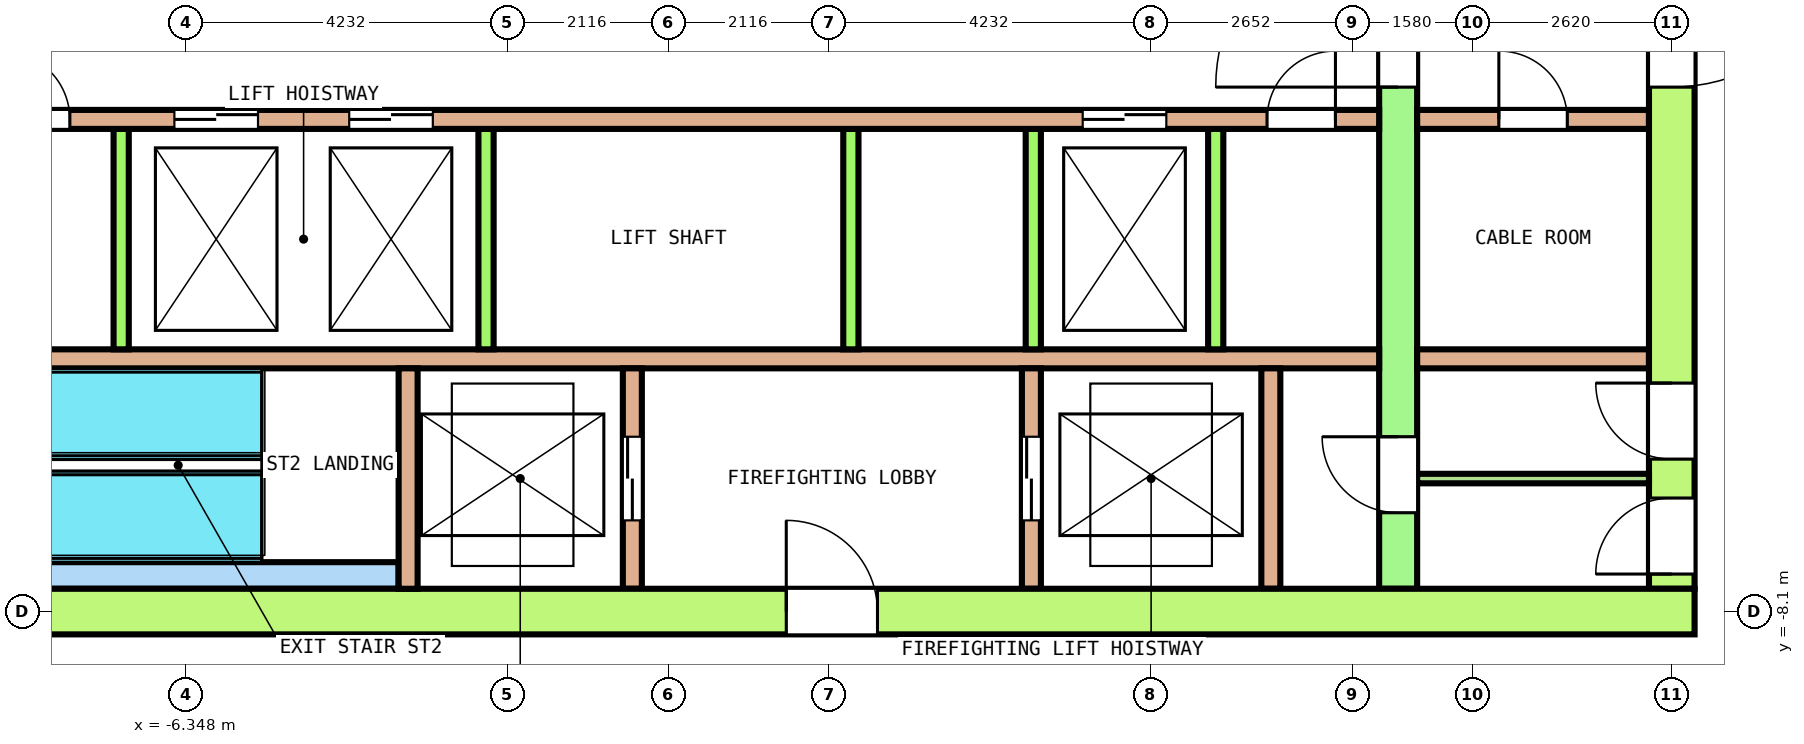
"""IFC4 building model, lengths in metres.
Left out: names, types, materials, properties, quantities, classifications, styles, units other than length and angle.
Written with IfcOpenShell. Run it as: python <this file> out.ifc"""

import sys

from ifc_helpers import new_model, si_unit, direction, frame, frame_2d, origin, place, context, subcontext, project, spatial, polyline, rectangle, outline, extrude, element, fill, save


model = new_model("IFC4")
c1 = context("Model", 3, precision=1e-05, world=origin(), true_north=direction((0.0, 1.0)))
c2 = subcontext(c1, "Body", "Model", "MODEL_VIEW")
j1 = project(units=[si_unit("LENGTHUNIT", "METRE"), si_unit("PLANEANGLEUNIT", "RADIAN")], contexts=[c1])
p1 = place(None, origin())
s1 = spatial("IfcSite", under=j1, at=p1, CompositionType="ELEMENT")
p2 = place(p1, origin())
s2 = spatial("IfcBuilding", under=s1, at=p2, CompositionType="ELEMENT")
p3 = place(p2, frame((0.0, 0.0, 227.4)))
s3 = spatial("IfcBuildingStorey", under=s2, at=p3, CompositionType="ELEMENT", Elevation=227.4)
p4 = place(p3, frame((13.841, -18.826, 0.0), z_axis=(0.0, 0.0, 1.0), x_axis=(0.499986710104, 0.866033076574, 0.0)))
e1 = element("IfcWall", 1, at=p4, inside=s3, PredefinedType="SOLIDWALL", context=c2, shape_type="SweptSolid", body=[
    extrude(outline(polyline([(-0.027, -0.1), (1.019, -0.1), (2.064, -0.1), (3.11, -0.1), (4.156, -0.1), (5.201, -0.1), (6.247, -0.1), (7.292, -0.1), (8.338, -0.1), (9.384, -0.1), (10.429, -0.1), (11.475, -0.1), (12.52, -0.1), (13.566, -0.1), (14.612, -0.1), (15.657, -0.1), (16.703, -0.1), (17.748, -0.1), (18.794, -0.1), (18.74, 0.1), (17.701, 0.1), (16.661, 0.1), (15.621, 0.1), (14.582, 0.1), (13.542, 0.1), (12.502, 0.1), (11.463, 0.1), (10.423, 0.1), (9.384, 0.1), (8.344, 0.1), (7.304, 0.1), (6.265, 0.1), (5.225, 0.1), (4.185, 0.1), (3.146, 0.1), (2.106, 0.1), (1.066, 0.1), (0.027, 0.1), (-0.027, -0.1)])), origin(), (0.0, 0.0, 1.0), 3.7),
])
p5 = place(p4, frame((0.427, 0.0, 0.1)))
e2 = element("IfcOpeningElement", 2, at=p5, cuts=e1, PredefinedType="OPENING", context=c2, shape_type="SweptSolid", body=[
    extrude(rectangle(XDim=2.9, YDim=2.65, at=frame_2d((1.45, 1.325))), frame((0.0, 0.11, 0.0), z_axis=(0.0, -1.0, 0.0), x_axis=(1.0, 0.0, 0.0)), (0.0, 0.0, 1.0), 0.22),
])
p6 = place(p4, frame((4.18, 0.0, 0.1)))
e3 = element("IfcOpeningElement", 3, at=p6, cuts=e1, PredefinedType="OPENING", context=c2, shape_type="SweptSolid", body=[
    extrude(rectangle(XDim=2.9, YDim=2.65, at=frame_2d((1.45, 1.325))), frame((0.0, 0.11, 0.0), z_axis=(0.0, -1.0, 0.0), x_axis=(1.0, 0.0, 0.0)), (0.0, 0.0, 1.0), 0.22),
])
p7 = place(p4, frame((8.483, 0.0, 0.0)))
e4 = element("IfcOpeningElement", 4, at=p7, cuts=e1, PredefinedType="OPENING", context=c2, shape_type="SweptSolid", body=[
    extrude(rectangle(XDim=1.8, YDim=2.4, at=frame_2d((0.9, 1.2))), frame((0.0, 0.11, 0.0), z_axis=(0.0, -1.0, 0.0), x_axis=(1.0, 0.0, 0.0)), (0.0, 0.0, 1.0), 0.22),
])
p8 = place(p4, frame((8.483, 0.0, 2.55)))
e5 = element("IfcOpeningElement", 5, at=p8, cuts=e1, PredefinedType="OPENING", context=c2, shape_type="SweptSolid", body=[
    extrude(rectangle(XDim=1.8, YDim=0.2, at=frame_2d((0.9, 0.1))), frame((0.0, 0.11, 0.0), z_axis=(0.0, -1.0, 0.0), x_axis=(1.0, 0.0, 0.0)), (0.0, 0.0, 1.0), 0.22),
])
p9 = place(p4, frame((11.687, 0.0, 0.1)))
e6 = element("IfcOpeningElement", 6, at=p9, cuts=e1, PredefinedType="OPENING", context=c2, shape_type="SweptSolid", body=[
    extrude(rectangle(XDim=2.9, YDim=2.65, at=frame_2d((1.45, 1.325))), frame((0.0, 0.11, 0.0), z_axis=(0.0, -1.0, 0.0), x_axis=(1.0, 0.0, 0.0)), (0.0, 0.0, 1.0), 0.22),
])
p10 = place(p4, frame((15.44, 0.0, 0.1)))
e7 = element("IfcOpeningElement", 7, at=p10, cuts=e1, PredefinedType="OPENING", context=c2, shape_type="SweptSolid", body=[
    extrude(rectangle(XDim=2.9, YDim=2.65, at=frame_2d((1.45, 1.325))), frame((0.0, 0.11, 0.0), z_axis=(0.0, -1.0, 0.0), x_axis=(1.0, 0.0, 0.0)), (0.0, 0.0, 1.0), 0.22),
])
p11 = place(p3, frame((-13.5, -8.1, 0.0), z_axis=(0.0, 0.0, 1.0), x_axis=(1.0, 0.0, 0.0)))
e8 = element("IfcWall", 8, at=p11, inside=s3, PredefinedType="SHEAR", context=c2, shape_type="SweptSolid", body=[
    extrude(rectangle(XDim=27.0, YDim=0.6, at=frame_2d((13.5, 0.0))), origin(), (0.0, 0.0, 1.0), 3.7),
])
p12 = place(p11, frame((15.05, 0.0, 0.0)))
e9 = element("IfcOpeningElement", 9, at=p12, cuts=e8, PredefinedType="OPENING", context=c2, shape_type="SweptSolid", body=[
    extrude(rectangle(XDim=1.2, YDim=2.1, at=frame_2d((0.6, 1.05))), frame((0.0, 0.31, 0.0), z_axis=(0.0, -1.0, 0.0), x_axis=(1.0, 0.0, 0.0)), (0.0, 0.0, 1.0), 0.62),
])
p13 = place(p3, frame((13.2, -7.8, 0.0), z_axis=(0.0, 0.0, 1.0), x_axis=(0.0, 1.0, 0.0)))
e10 = element("IfcWall", 10, at=p13, inside=s3, PredefinedType="SHEAR", context=c2, shape_type="SweptSolid", body=[
    extrude(rectangle(XDim=15.6, YDim=0.6, at=frame_2d((7.8, 0.0))), origin(), (0.0, 0.0, 1.0), 3.7),
])
p14 = place(p13, frame((6.6, 0.0, 0.0)))
e11 = element("IfcOpeningElement", 11, at=p14, cuts=e10, PredefinedType="OPENING", context=c2, shape_type="SweptSolid", body=[
    extrude(rectangle(XDim=2.4, YDim=2.1, at=frame_2d((1.2, 1.05))), frame((0.0, 0.31, 0.0), z_axis=(0.0, -1.0, 0.0), x_axis=(1.0, 0.0, 0.0)), (0.0, 0.0, 1.0), 0.62),
])
p15 = place(p13, frame((13.5, 0.0, 0.0)))
e12 = element("IfcOpeningElement", 12, at=p15, cuts=e10, PredefinedType="OPENING", context=c2, shape_type="SweptSolid", body=[
    extrude(rectangle(XDim=1.2, YDim=2.1, at=frame_2d((0.6, 1.05))), frame((0.0, 0.31, 0.0), z_axis=(0.0, -1.0, 0.0), x_axis=(1.0, 0.0, 0.0)), (0.0, 0.0, 1.0), 0.62),
])
p16 = place(p13, frame((0.194, 0.0, 0.0)))
e13 = element("IfcOpeningElement", 13, at=p16, cuts=e10, PredefinedType="OPENING", context=c2, shape_type="SweptSolid", body=[
    extrude(rectangle(XDim=1.0, YDim=2.1, at=frame_2d((0.5, 1.05))), frame((0.0, 0.31, 0.0), z_axis=(0.0, -1.0, 0.0), x_axis=(1.0, 0.0, 0.0)), (0.0, 0.0, 1.0), 0.62),
])
p17 = place(p13, frame((1.706, 0.0, 0.0)))
e14 = element("IfcOpeningElement", 14, at=p17, cuts=e10, PredefinedType="OPENING", context=c2, shape_type="SweptSolid", body=[
    extrude(rectangle(XDim=1.0, YDim=2.1, at=frame_2d((0.5, 1.05))), frame((0.0, 0.31, 0.0), z_axis=(0.0, -1.0, 0.0), x_axis=(1.0, 0.0, 0.0)), (0.0, 0.0, 1.0), 0.62),
])
p18 = place(p3, frame((9.6, -7.8, 0.0), z_axis=(0.0, 0.0, 1.0), x_axis=(0.0, 1.0, 0.0)))
e15 = element("IfcWall", 15, at=p18, inside=s3, PredefinedType="SHEAR", context=c2, shape_type="SweptSolid", body=[
    extrude(rectangle(XDim=15.6, YDim=0.5, at=frame_2d((7.8, 0.0))), origin(), (0.0, 0.0, 1.0), 3.7),
])
p19 = place(p18, frame((6.6, 0.0, 0.0)))
e16 = element("IfcOpeningElement", 16, at=p19, cuts=e15, PredefinedType="OPENING", context=c2, shape_type="SweptSolid", body=[
    extrude(rectangle(XDim=2.4, YDim=2.1, at=frame_2d((1.2, 1.05))), frame((0.0, 0.26, 0.0), z_axis=(0.0, -1.0, 0.0), x_axis=(1.0, 0.0, 0.0)), (0.0, 0.0, 1.0), 0.52),
])
p20 = place(p18, frame((13.5, 0.0, 0.0)))
e17 = element("IfcOpeningElement", 17, at=p20, cuts=e15, PredefinedType="OPENING", context=c2, shape_type="SweptSolid", body=[
    extrude(rectangle(XDim=1.2, YDim=2.1, at=frame_2d((0.6, 1.05))), frame((0.0, 0.26, 0.0), z_axis=(0.0, -1.0, 0.0), x_axis=(1.0, 0.0, 0.0)), (0.0, 0.0, 1.0), 0.52),
])
p21 = place(p18, frame((1.0, 0.0, 0.0)))
e18 = element("IfcOpeningElement", 18, at=p21, cuts=e15, PredefinedType="OPENING", context=c2, shape_type="SweptSolid", body=[
    extrude(rectangle(XDim=1.0, YDim=2.1, at=frame_2d((0.5, 1.05))), frame((0.0, 0.26, 0.0), z_axis=(0.0, -1.0, 0.0), x_axis=(1.0, 0.0, 0.0)), (0.0, 0.0, 1.0), 0.52),
])
p22 = place(p3, frame((-9.35, -1.625, 0.0), z_axis=(0.0, 0.0, 1.0), x_axis=(1.0, 0.0, 0.0)))
e19 = element("IfcWall", 19, at=p22, inside=s3, PredefinedType="SOLIDWALL", context=c2, shape_type="SweptSolid", body=[
    extrude(rectangle(XDim=18.7, YDim=0.25, at=frame_2d((9.35, 0.0))), origin(), (0.0, 0.0, 1.0), 3.7),
])
p23 = place(p22, frame((2.85, 0.0, 0.0)))
e20 = element("IfcOpeningElement", 20, at=p23, cuts=e19, PredefinedType="OPENING", context=c2, shape_type="SweptSolid", body=[
    extrude(rectangle(XDim=1.1, YDim=2.1, at=frame_2d((0.55, 1.05))), frame((0.0, 0.135, 0.0), z_axis=(0.0, -1.0, 0.0), x_axis=(1.0, 0.0, 0.0)), (0.0, 0.0, 1.0), 0.27),
])
p24 = place(p22, frame((5.15, 0.0, 0.0)))
e21 = element("IfcOpeningElement", 21, at=p24, cuts=e19, PredefinedType="OPENING", context=c2, shape_type="SweptSolid", body=[
    extrude(rectangle(XDim=1.1, YDim=2.1, at=frame_2d((0.55, 1.05))), frame((0.0, 0.135, 0.0), z_axis=(0.0, -1.0, 0.0), x_axis=(1.0, 0.0, 0.0)), (0.0, 0.0, 1.0), 0.27),
])
p25 = place(p22, frame((14.8, 0.0, 0.0)))
e22 = element("IfcOpeningElement", 22, at=p25, cuts=e19, PredefinedType="OPENING", context=c2, shape_type="SweptSolid", body=[
    extrude(rectangle(XDim=1.1, YDim=2.1, at=frame_2d((0.55, 1.05))), frame((0.0, 0.135, 0.0), z_axis=(0.0, -1.0, 0.0), x_axis=(1.0, 0.0, 0.0)), (0.0, 0.0, 1.0), 0.27),
])
p26 = place(p22, frame((0.575, 0.0, 0.0)))
e23 = element("IfcOpeningElement", 23, at=p26, cuts=e19, PredefinedType="OPENING", context=c2, shape_type="SweptSolid", body=[
    extrude(rectangle(XDim=0.9, YDim=2.1, at=frame_2d((0.45, 1.05))), frame((0.0, 0.135, 0.0), z_axis=(0.0, -1.0, 0.0), x_axis=(1.0, 0.0, 0.0)), (0.0, 0.0, 1.0), 0.27),
])
p27 = place(p22, frame((17.225, 0.0, 0.0)))
e24 = element("IfcOpeningElement", 24, at=p27, cuts=e19, PredefinedType="OPENING", context=c2, shape_type="SweptSolid", body=[
    extrude(rectangle(XDim=0.9, YDim=2.1, at=frame_2d((0.45, 1.05))), frame((0.0, 0.135, 0.0), z_axis=(0.0, -1.0, 0.0), x_axis=(1.0, 0.0, 0.0)), (0.0, 0.0, 1.0), 0.27),
])
p28 = place(p3, frame((9.85, -1.625, 0.0), z_axis=(0.0, 0.0, 1.0), x_axis=(1.0, 0.0, 0.0)))
e25 = element("IfcWall", 25, at=p28, inside=s3, PredefinedType="SOLIDWALL", context=c2, shape_type="SweptSolid", body=[
    extrude(rectangle(XDim=3.05, YDim=0.25, at=frame_2d((1.525, 0.0))), origin(), (0.0, 0.0, 1.0), 3.7),
])
p29 = place(p28, frame((1.075, 0.0, 0.0)))
e26 = element("IfcOpeningElement", 26, at=p29, cuts=e25, PredefinedType="OPENING", context=c2, shape_type="SweptSolid", body=[
    extrude(rectangle(XDim=0.9, YDim=2.1, at=frame_2d((0.45, 1.05))), frame((0.0, 0.135, 0.0), z_axis=(0.0, -1.0, 0.0), x_axis=(1.0, 0.0, 0.0)), (0.0, 0.0, 1.0), 0.27),
])
p30 = place(p3, frame((-9.35, -4.775, 0.0), z_axis=(0.0, 0.0, 1.0), x_axis=(1.0, 0.0, 0.0)))
e27 = element("IfcWall", 27, at=p30, inside=s3, PredefinedType="SOLIDWALL", context=c2, shape_type="SweptSolid", body=[
    extrude(rectangle(XDim=18.7, YDim=0.25, at=frame_2d((9.35, 0.0))), origin(), (0.0, 0.0, 1.0), 3.7),
])
p31 = place(p3, frame((9.85, -4.775, 0.0), z_axis=(0.0, 0.0, 1.0), x_axis=(1.0, 0.0, 0.0)))
e28 = element("IfcWall", 28, at=p31, inside=s3, PredefinedType="SOLIDWALL", context=c2, shape_type="SweptSolid", body=[
    extrude(rectangle(XDim=3.05, YDim=0.25, at=frame_2d((1.525, 0.0))), origin(), (0.0, 0.0, 1.0), 3.7),
])
for number, where, z_axis, x_axis in (
    (29, (-7.2, -4.65, 0.0), (0.0, 0.0, 1.0), (0.0, 1.0, 0.0)),
    (30, (-2.4, -4.65, 0.0), (0.0, 0.0, 1.0), (0.0, 1.0, 0.0)),
    (31, (2.4, -4.65, 0.0), (0.0, 0.0, 1.0), (0.0, 1.0, 0.0)),
    (32, (4.8, -4.65, 0.0), (0.0, 0.0, 1.0), (0.0, 1.0, 0.0)),
    (33, (7.2, -4.65, 0.0), (0.0, 0.0, 1.0), (0.0, 1.0, 0.0)),
):
    element("IfcWall", number, at=place(p3, frame(where, z_axis=z_axis, x_axis=x_axis)), inside=s3, PredefinedType="SOLIDWALL", context=c2, shape_type="SweptSolid", body=[
        extrude(rectangle(XDim=2.9, YDim=0.2, at=frame_2d((1.45, 0.0))), origin(), (0.0, 0.0, 1.0), 3.7),
    ])
p32 = place(p3, frame((-9.35, -7.625, 0.0), z_axis=(0.0, 0.0, 1.0), x_axis=(1.0, 0.0, 0.0)))
e34 = element("IfcWall", 34, at=p32, inside=s3, PredefinedType="SOLIDWALL", context=c2, shape_type="SweptSolid", body=[
    extrude(rectangle(XDim=5.8, YDim=0.35, at=frame_2d((2.9, 0.0))), origin(), (0.0, 0.0, 1.0), 3.7),
])
p33 = place(p3, frame((-3.425, -7.8, 0.0), z_axis=(0.0, 0.0, 1.0), x_axis=(0.0, 1.0, 0.0)))
e35 = element("IfcWall", 35, at=p33, inside=s3, PredefinedType="SOLIDWALL", context=c2, shape_type="SweptSolid", body=[
    extrude(rectangle(XDim=2.9, YDim=0.25, at=frame_2d((1.45, 0.0))), origin(), (0.0, 0.0, 1.0), 3.7),
])
p34 = place(p3, frame((-0.475, -7.8, 0.0), z_axis=(0.0, 0.0, 1.0), x_axis=(0.0, 1.0, 0.0)))
e36 = element("IfcWall", 36, at=p34, inside=s3, PredefinedType="SOLIDWALL", context=c2, shape_type="SweptSolid", body=[
    extrude(rectangle(XDim=2.9, YDim=0.25, at=frame_2d((1.45, 0.0))), origin(), (0.0, 0.0, 1.0), 3.7),
])
p35 = place(p34, frame((0.9, 0.0, 0.0)))
e37 = element("IfcOpeningElement", 37, at=p35, cuts=e36, PredefinedType="OPENING", context=c2, shape_type="SweptSolid", body=[
    extrude(rectangle(XDim=1.1, YDim=2.1, at=frame_2d((0.55, 1.05))), frame((0.0, 0.135, 0.0), z_axis=(0.0, -1.0, 0.0), x_axis=(1.0, 0.0, 0.0)), (0.0, 0.0, 1.0), 0.27),
])
p36 = place(p3, frame((4.775, -7.8, 0.0), z_axis=(0.0, 0.0, 1.0), x_axis=(0.0, 1.0, 0.0)))
e38 = element("IfcWall", 38, at=p36, inside=s3, PredefinedType="SOLIDWALL", context=c2, shape_type="SweptSolid", body=[
    extrude(rectangle(XDim=2.9, YDim=0.25, at=frame_2d((1.45, 0.0))), origin(), (0.0, 0.0, 1.0), 3.7),
])
p37 = place(p36, frame((0.9, 0.0, 0.0)))
e39 = element("IfcOpeningElement", 39, at=p37, cuts=e38, PredefinedType="OPENING", context=c2, shape_type="SweptSolid", body=[
    extrude(rectangle(XDim=1.1, YDim=2.1, at=frame_2d((0.55, 1.05))), frame((0.0, 0.135, 0.0), z_axis=(0.0, -1.0, 0.0), x_axis=(1.0, 0.0, 0.0)), (0.0, 0.0, 1.0), 0.27),
])
p38 = place(p3, frame((7.925, -7.8, 0.0), z_axis=(0.0, 0.0, 1.0), x_axis=(0.0, 1.0, 0.0)))
e40 = element("IfcWall", 40, at=p38, inside=s3, PredefinedType="SOLIDWALL", context=c2, shape_type="SweptSolid", body=[
    extrude(rectangle(XDim=2.9, YDim=0.25, at=frame_2d((1.45, 0.0))), origin(), (0.0, 0.0, 1.0), 3.7),
])
p39 = place(p3, frame((9.85, -6.35, 0.0), z_axis=(0.0, 0.0, 1.0), x_axis=(1.0, 0.0, 0.0)))
e41 = element("IfcWall", 41, at=p39, inside=s3, PredefinedType="PARTITIONING", context=c2, shape_type="SweptSolid", body=[
    extrude(rectangle(XDim=3.05, YDim=0.125, at=frame_2d((1.525, 0.0))), origin(), (0.0, 0.0, 1.0), 3.7),
])
p40 = place(p23, origin())
e42 = element("IfcDoor", 42, at=p40, inside=s3, OperationType="DOUBLE_DOOR_SLIDING", PredefinedType="DOOR", context=c2, shape_type="SweptSolid", body=[
    extrude(rectangle(XDim=1.1, YDim=2.1, at=frame_2d((0.55, 1.05))), frame((0.0, 0.075, 0.0), z_axis=(0.0, -1.0, 0.0), x_axis=(1.0, 0.0, 0.0)), (0.0, 0.0, 1.0), 0.15),
])
fill(e20, e42)
p41 = place(p24, origin())
e43 = element("IfcDoor", 43, at=p41, inside=s3, OperationType="DOUBLE_DOOR_SLIDING", PredefinedType="DOOR", context=c2, shape_type="SweptSolid", body=[
    extrude(rectangle(XDim=1.1, YDim=2.1, at=frame_2d((0.55, 1.05))), frame((0.0, 0.075, 0.0), z_axis=(0.0, -1.0, 0.0), x_axis=(1.0, 0.0, 0.0)), (0.0, 0.0, 1.0), 0.15),
])
fill(e21, e43)
p42 = place(p25, origin())
e44 = element("IfcDoor", 44, at=p42, inside=s3, OperationType="DOUBLE_DOOR_SLIDING", PredefinedType="DOOR", context=c2, shape_type="SweptSolid", body=[
    extrude(rectangle(XDim=1.1, YDim=2.1, at=frame_2d((0.55, 1.05))), frame((0.0, 0.075, 0.0), z_axis=(0.0, -1.0, 0.0), x_axis=(1.0, 0.0, 0.0)), (0.0, 0.0, 1.0), 0.15),
])
fill(e22, e44)
p43 = place(p35, origin())
e45 = element("IfcDoor", 45, at=p43, inside=s3, OperationType="DOUBLE_DOOR_SLIDING", PredefinedType="DOOR", context=c2, shape_type="SweptSolid", body=[
    extrude(rectangle(XDim=1.1, YDim=2.1, at=frame_2d((0.55, 1.05))), frame((0.0, 0.075, 0.0), z_axis=(0.0, -1.0, 0.0), x_axis=(1.0, 0.0, 0.0)), (0.0, 0.0, 1.0), 0.15),
])
fill(e37, e45)
p44 = place(p37, origin())
e46 = element("IfcDoor", 46, at=p44, inside=s3, OperationType="DOUBLE_DOOR_SLIDING", PredefinedType="DOOR", context=c2, shape_type="SweptSolid", body=[
    extrude(rectangle(XDim=1.1, YDim=2.1, at=frame_2d((0.55, 1.05))), frame((0.0, 0.075, 0.0), z_axis=(0.0, -1.0, 0.0), x_axis=(1.0, 0.0, 0.0)), (0.0, 0.0, 1.0), 0.15),
])
fill(e39, e46)
p45 = place(p19, origin())
e47 = element("IfcDoor", 47, at=p45, inside=s3, OperationType="DOUBLE_DOOR_SINGLE_SWING", PredefinedType="DOOR", context=c2, shape_type="SweptSolid", body=[
    extrude(rectangle(XDim=2.4, YDim=2.1, at=frame_2d((1.2, 1.05))), frame((0.0, 0.2, 0.0), z_axis=(0.0, -1.0, 0.0), x_axis=(1.0, 0.0, 0.0)), (0.0, 0.0, 1.0), 0.4),
])
fill(e16, e47)
p46 = place(p14, origin())
e48 = element("IfcDoor", 48, at=p46, inside=s3, OperationType="DOUBLE_DOOR_SINGLE_SWING", PredefinedType="DOOR", context=c2, shape_type="SweptSolid", body=[
    extrude(rectangle(XDim=2.4, YDim=2.1, at=frame_2d((1.2, 1.05))), frame((0.0, 0.25, 0.0), z_axis=(0.0, -1.0, 0.0), x_axis=(1.0, 0.0, 0.0)), (0.0, 0.0, 1.0), 0.5),
])
fill(e11, e48)
p47 = place(p12, origin())
e49 = element("IfcDoor", 49, at=p47, inside=s3, OperationType="SINGLE_SWING_LEFT", PredefinedType="DOOR", context=c2, shape_type="SweptSolid", body=[
    extrude(rectangle(XDim=1.2, YDim=2.1, at=frame_2d((0.6, 1.05))), frame((0.0, 0.25, 0.0), z_axis=(0.0, -1.0, 0.0), x_axis=(1.0, 0.0, 0.0)), (0.0, 0.0, 1.0), 0.5),
])
fill(e9, e49)
p48 = place(p21, origin())
e50 = element("IfcDoor", 50, at=p48, inside=s3, OperationType="SINGLE_SWING_LEFT", PredefinedType="DOOR", context=c2, shape_type="SweptSolid", body=[
    extrude(rectangle(XDim=1.0, YDim=2.1, at=frame_2d((0.5, 1.05))), frame((0.0, 0.2, 0.0), z_axis=(0.0, -1.0, 0.0), x_axis=(1.0, 0.0, 0.0)), (0.0, 0.0, 1.0), 0.4),
])
fill(e18, e50)
p49 = place(p16, origin())
e51 = element("IfcDoor", 51, at=p49, inside=s3, OperationType="SINGLE_SWING_RIGHT", PredefinedType="DOOR", context=c2, shape_type="SweptSolid", body=[
    extrude(rectangle(XDim=1.0, YDim=2.1, at=frame_2d((0.5, 1.05))), frame((0.0, 0.25, 0.0), z_axis=(0.0, -1.0, 0.0), x_axis=(1.0, 0.0, 0.0)), (0.0, 0.0, 1.0), 0.5),
])
fill(e13, e51)
p50 = place(p17, origin())
e52 = element("IfcDoor", 52, at=p50, inside=s3, OperationType="SINGLE_SWING_LEFT", PredefinedType="DOOR", context=c2, shape_type="SweptSolid", body=[
    extrude(rectangle(XDim=1.0, YDim=2.1, at=frame_2d((0.5, 1.05))), frame((0.0, 0.25, 0.0), z_axis=(0.0, -1.0, 0.0), x_axis=(1.0, 0.0, 0.0)), (0.0, 0.0, 1.0), 0.5),
])
fill(e14, e52)
p51 = place(p26, origin())
e53 = element("IfcDoor", 53, at=p51, inside=s3, OperationType="SINGLE_SWING_LEFT", PredefinedType="DOOR", context=c2, shape_type="SweptSolid", body=[
    extrude(rectangle(XDim=0.9, YDim=2.1, at=frame_2d((0.45, 1.05))), frame((0.0, 0.075, 0.0), z_axis=(0.0, -1.0, 0.0), x_axis=(1.0, 0.0, 0.0)), (0.0, 0.0, 1.0), 0.15),
])
fill(e23, e53)
p52 = place(p27, origin())
e54 = element("IfcDoor", 54, at=p52, inside=s3, OperationType="SINGLE_SWING_RIGHT", PredefinedType="DOOR", context=c2, shape_type="SweptSolid", body=[
    extrude(rectangle(XDim=0.9, YDim=2.1, at=frame_2d((0.45, 1.05))), frame((0.0, 0.075, 0.0), z_axis=(0.0, -1.0, 0.0), x_axis=(1.0, 0.0, 0.0)), (0.0, 0.0, 1.0), 0.15),
])
fill(e24, e54)
p53 = place(p29, origin())
e55 = element("IfcDoor", 55, at=p53, inside=s3, OperationType="SINGLE_SWING_LEFT", PredefinedType="DOOR", context=c2, shape_type="SweptSolid", body=[
    extrude(rectangle(XDim=0.9, YDim=2.1, at=frame_2d((0.45, 1.05))), frame((0.0, 0.075, 0.0), z_axis=(0.0, -1.0, 0.0), x_axis=(1.0, 0.0, 0.0)), (0.0, 0.0, 1.0), 0.15),
])
fill(e26, e55)
save(model, sys.argv[1])
